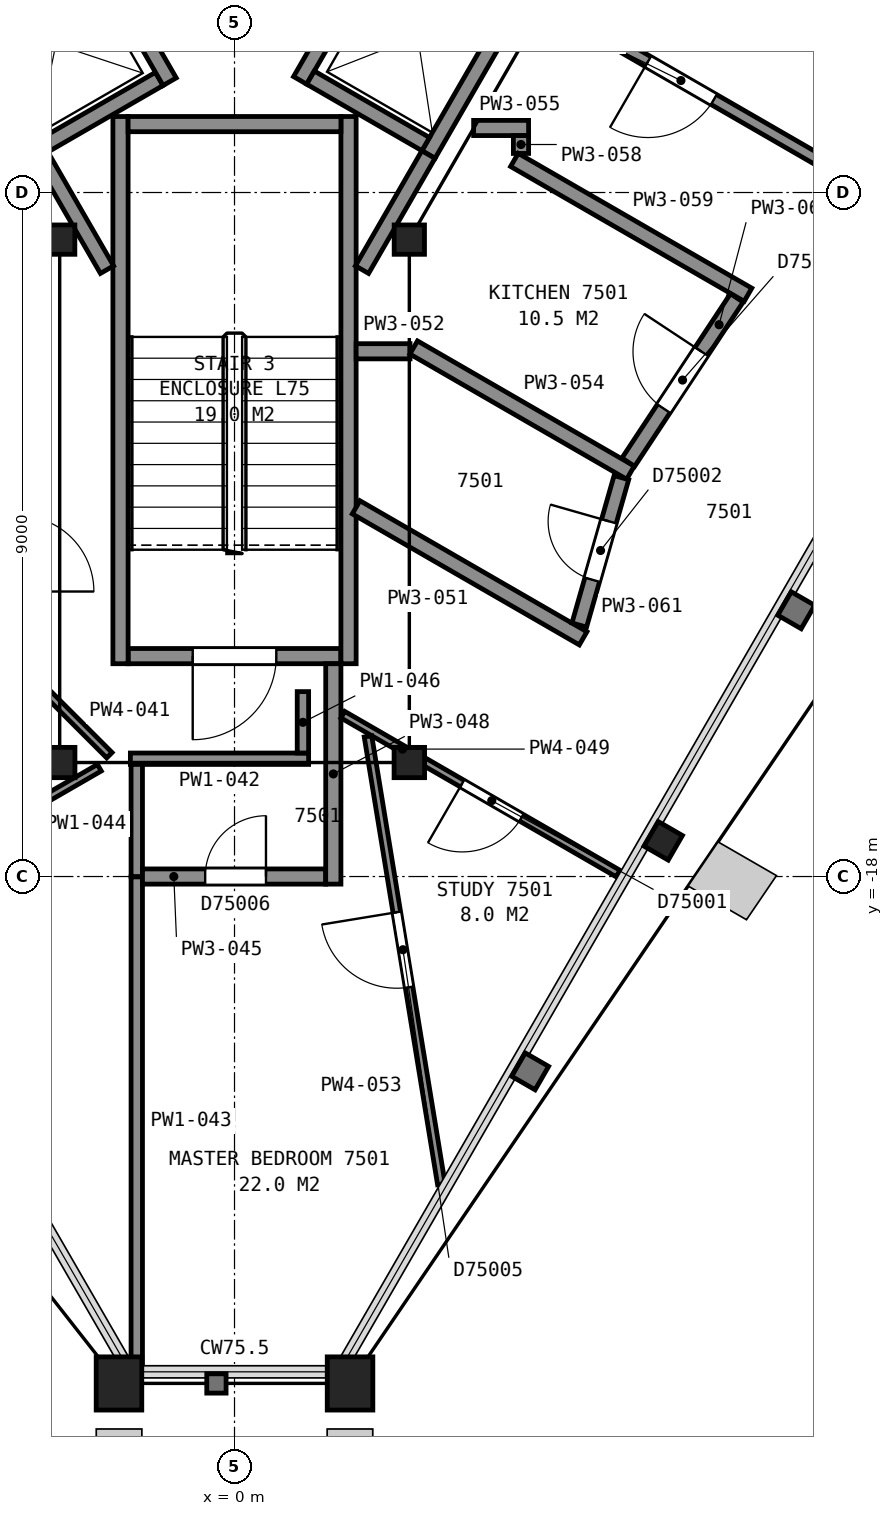
"""IFC4 building model, lengths in metres.
Left out: names, types, materials, properties, quantities, classifications, styles, units other than length and angle.
Written with IfcOpenShell. Run it as: python <this file> out.ifc"""

import sys

from ifc_helpers import new_model, si_unit, direction, frame, frame_2d, origin, origin_2d, place, context, subcontext, project, spatial, rectangle, hollow_rectangle, i_section, extrude, element, fill, save


model = new_model("IFC4")
c1 = context("Model", 3, precision=1e-05, world=origin(), true_north=direction((0.0, 1.0)))
c2 = subcontext(c1, "Body", "Model", "MODEL_VIEW")
j1 = project(units=[si_unit("LENGTHUNIT", "METRE"), si_unit("PLANEANGLEUNIT", "RADIAN")], contexts=[c1])
p1 = place(None, origin())
s1 = spatial("IfcSite", under=j1, at=p1, CompositionType="ELEMENT")
p2 = place(p1, origin())
s2 = spatial("IfcBuilding", under=s1, at=p2, CompositionType="ELEMENT")
p3 = place(p2, frame((0.0, 0.0, 297.3)))
s3 = spatial("IfcBuildingStorey", under=s2, at=p3, CompositionType="ELEMENT", Elevation=297.3)
for number, where, z_axis, x_axis in (
    (1, (-1.52, -24.67, 0.0), (0.0, 0.0, 1.0), (-1.0, 0.0, 0.0)),
    (2, (1.52, -24.67, 0.0), (0.0, 0.0, 1.0), (-1.0, 0.0, 0.0)),
):
    element("IfcColumn", number, at=place(p3, frame(where, z_axis=z_axis, x_axis=x_axis)), inside=s3, PredefinedType="COLUMN", context=c2, shape_type="SweptSolid", body=[
        extrude(hollow_rectangle(XDim=0.6, YDim=0.7, WallThickness=0.04, at=origin_2d()), origin(), (0.0, 0.0, 1.0), 3.7),
    ])
p4 = place(p3, frame((5.64, -17.53, 0.0), z_axis=(0.0, 0.0, 1.0), x_axis=(-0.5, -0.866025403784, 0.0)))
e3 = element("IfcColumn", 3, at=p4, inside=s3, PredefinedType="COLUMN", context=c2, shape_type="SweptSolid", body=[
    extrude(i_section(OverallWidth=0.373, OverallDepth=0.368, WebThickness=0.015, FlangeThickness=0.024, FilletRadius=0.015, at=origin_2d()), origin(), (0.0, 0.0, 1.0), 3.7),
])
p5 = place(p3, frame((-2.3, -9.62, 0.0), z_axis=(0.0, 0.0, 1.0), x_axis=(1.0, 0.0, 0.0)))
e4 = element("IfcColumn", 4, at=p5, inside=s3, PredefinedType="COLUMN", context=c2, shape_type="SweptSolid", body=[
    extrude(i_section(OverallWidth=0.399, OverallDepth=0.386, WebThickness=0.021, FlangeThickness=0.033, FilletRadius=0.015, at=origin_2d()), origin(), (0.0, 0.0, 1.0), 3.7),
])
for number, where, z_axis, x_axis in (
    (5, (-2.3, -16.5, 0.0), (0.0, 0.0, 1.0), (-1.0, 0.0, 0.0)),
    (6, (2.3, -16.5, 0.0), (0.0, 0.0, 1.0), (-1.0, 0.0, 0.0)),
):
    element("IfcColumn", number, at=place(p3, frame(where, z_axis=z_axis, x_axis=x_axis)), inside=s3, PredefinedType="COLUMN", context=c2, shape_type="SweptSolid", body=[
        extrude(i_section(OverallWidth=0.401, OverallDepth=0.399, WebThickness=0.025, FlangeThickness=0.04, FilletRadius=0.015, at=origin_2d()), origin(), (0.0, 0.0, 1.0), 3.7),
    ])
p6 = place(p3, frame((2.3, -9.62, 0.0), z_axis=(0.0, 0.0, 1.0), x_axis=(1.0, 0.0, 0.0)))
e7 = element("IfcColumn", 7, at=p6, inside=s3, PredefinedType="COLUMN", context=c2, shape_type="SweptSolid", body=[
    extrude(i_section(OverallWidth=0.399, OverallDepth=0.386, WebThickness=0.021, FlangeThickness=0.033, FilletRadius=0.015, at=origin_2d()), origin(), (0.0, 0.0, 1.0), 3.7),
])
p7 = place(p3, frame((-1.4, -15.1, 0.0), z_axis=(0.0, 0.0, 1.0), x_axis=(1.0, 0.0, 0.0)))
e8 = element("IfcWall", 8, at=p7, inside=s3, PredefinedType="PARTITIONING", context=c2, shape_type="SweptSolid", body=[
    extrude(rectangle(XDim=2.8, YDim=0.2, at=frame_2d((1.4, 0.0))), origin(), (0.0, 0.0, 1.0), 3.45),
])
p8 = place(p7, frame((0.85, 0.0, 0.0)))
e9 = element("IfcOpeningElement", 9, at=p8, cuts=e8, PredefinedType="OPENING", context=c2, shape_type="SweptSolid", body=[
    extrude(rectangle(XDim=1.1, YDim=2.1, at=frame_2d((0.55, 1.05))), frame((0.0, 0.11, 0.0), z_axis=(0.0, -1.0, 0.0), x_axis=(1.0, 0.0, 0.0)), (0.0, 0.0, 1.0), 0.22),
])
for number, where, z_axis, x_axis in (
    (10, (1.5, -8.0, 0.0), (0.0, 0.0, 1.0), (0.0, -1.0, 0.0)),
    (11, (-1.5, -8.0, 0.0), (0.0, 0.0, 1.0), (0.0, -1.0, 0.0)),
):
    element("IfcWall", number, at=place(p3, frame(where, z_axis=z_axis, x_axis=x_axis)), inside=s3, PredefinedType="PARTITIONING", context=c2, shape_type="SweptSolid", body=[
        extrude(rectangle(XDim=7.2, YDim=0.2, at=frame_2d((3.6, 0.0))), origin(), (0.0, 0.0, 1.0), 3.45),
    ])
p9 = place(p3, frame((-1.4, -8.1, 0.0), z_axis=(0.0, 0.0, 1.0), x_axis=(1.0, 0.0, 0.0)))
e12 = element("IfcWall", 12, at=p9, inside=s3, PredefinedType="PARTITIONING", context=c2, shape_type="SweptSolid", body=[
    extrude(rectangle(XDim=2.8, YDim=0.2, at=frame_2d((1.4, 0.0))), origin(), (0.0, 0.0, 1.0), 3.45),
])
p10 = place(p3, frame((-2.505, -8.38, 0.0), z_axis=(0.0, 0.0, 1.0), x_axis=(0.866002029911, 0.500040482552, 0.0)))
e13 = element("IfcWall", 13, at=p10, inside=s3, PredefinedType="PARTITIONING", context=c2, shape_type="SweptSolid", body=[
    extrude(rectangle(XDim=1.75, YDim=0.2, at=frame_2d((0.875, 0.0))), origin(), (0.0, 0.0, 1.0), 3.7),
])
p11 = place(p3, frame((2.552, -8.5, 0.0), z_axis=(0.0, 0.0, 1.0), x_axis=(0.499990435942, 0.866030925526, 0.0)))
e14 = element("IfcWall", 14, at=p11, inside=s3, PredefinedType="PARTITIONING", context=c2, shape_type="SweptSolid", body=[
    extrude(rectangle(XDim=2.55, YDim=0.2, at=frame_2d((1.275, 0.0))), origin(), (0.0, 0.0, 1.0), 3.7),
])
p12 = place(p3, frame((0.863, -7.525, 0.0), z_axis=(0.0, 0.0, 1.0), x_axis=(0.499990435942, 0.866030925526, 0.0)))
e15 = element("IfcWall", 15, at=p12, inside=s3, PredefinedType="PARTITIONING", context=c2, shape_type="SweptSolid", body=[
    extrude(rectangle(XDim=2.55, YDim=0.2, at=frame_2d((1.275, 0.0))), origin(), (0.0, 0.0, 1.0), 3.7),
])
p13 = place(p12, frame((0.725, 0.0, 0.0)))
e16 = element("IfcOpeningElement", 16, at=p13, cuts=e15, PredefinedType="OPENING", context=c2, shape_type="SweptSolid", body=[
    extrude(rectangle(XDim=1.1, YDim=2.1, at=frame_2d((0.55, 1.05))), frame((0.0, 0.11, 0.0), z_axis=(0.0, -1.0, 0.0), x_axis=(1.0, 0.0, 0.0)), (0.0, 0.0, 1.0), 0.22),
])
p14 = place(p3, frame((-0.853, -7.542, 0.0), z_axis=(0.0, 0.0, 1.0), x_axis=(-0.500016218704, 0.866016039709, 0.0)))
e17 = element("IfcWall", 17, at=p14, inside=s3, PredefinedType="PARTITIONING", context=c2, shape_type="SweptSolid", body=[
    extrude(rectangle(XDim=2.35, YDim=0.2, at=frame_2d((1.175, 0.0))), origin(), (0.0, 0.0, 1.0), 3.7),
])
p15 = place(p14, frame((0.625, 0.0, 0.0)))
e18 = element("IfcOpeningElement", 18, at=p15, cuts=e17, PredefinedType="OPENING", context=c2, shape_type="SweptSolid", body=[
    extrude(rectangle(XDim=1.1, YDim=2.1, at=frame_2d((0.55, 1.05))), frame((0.0, 0.11, 0.0), z_axis=(0.0, -1.0, 0.0), x_axis=(1.0, 0.0, 0.0)), (0.0, 0.0, 1.0), 0.22),
])
p16 = place(p3, frame((2.515, -8.363, 0.0), z_axis=(0.0, 0.0, 1.0), x_axis=(-0.866036909293, 0.499980071345, 0.0)))
e19 = element("IfcWall", 19, at=p16, inside=s3, PredefinedType="PARTITIONING", context=c2, shape_type="SweptSolid", body=[
    extrude(rectangle(XDim=1.75, YDim=0.2, at=frame_2d((0.875, 0.0))), origin(), (0.0, 0.0, 1.0), 3.7),
])
p17 = place(p3, frame((-2.541, -8.519, 0.0), z_axis=(0.0, 0.0, 1.0), x_axis=(0.500016142392, -0.86601608377, 0.0)))
e20 = element("IfcWall", 20, at=p17, inside=s3, PredefinedType="PARTITIONING", context=c2, shape_type="SweptSolid", body=[
    extrude(rectangle(XDim=1.727, YDim=0.2, at=frame_2d((0.864, 0.0))), origin(), (0.0, 0.0, 1.0), 3.45),
])
p18 = place(p3, frame((1.677, -10.015, 0.0), z_axis=(0.0, 0.0, 1.0), x_axis=(0.49983532306, 0.866120459187, 0.0)))
e21 = element("IfcWall", 21, at=p18, inside=s3, PredefinedType="PARTITIONING", context=c2, shape_type="SweptSolid", body=[
    extrude(rectangle(XDim=1.748, YDim=0.2, at=frame_2d((0.874, 0.0))), origin(), (0.0, 0.0, 1.0), 3.45),
])
p19 = place(p3, frame((-1.778, -16.568, 0.0), z_axis=(0.0, 0.0, 1.0), x_axis=(-0.866019606374, -0.500010041276, 0.0)))
e22 = element("IfcWall", 22, at=p19, inside=s3, PredefinedType="PARTITIONING", context=c2, shape_type="SweptSolid", body=[
    extrude(rectangle(XDim=3.527, YDim=0.1, at=frame_2d((1.764, 0.0))), origin(), (0.0, 0.0, 1.0), 2.723),
])
p20 = place(p19, frame((1.124, 0.0, 0.0)))
e23 = element("IfcOpeningElement", 23, at=p20, cuts=e22, PredefinedType="OPENING", context=c2, shape_type="SweptSolid", body=[
    extrude(rectangle(XDim=1.0, YDim=2.1, at=frame_2d((0.5, 1.05))), frame((0.0, 0.06, 0.0), z_axis=(0.0, -1.0, 0.0), x_axis=(1.0, 0.0, 0.0)), (0.0, 0.0, 1.0), 0.12),
])
p21 = place(p3, frame((-2.801, -15.25, 0.0), z_axis=(0.0, 0.0, 1.0), x_axis=(0.707181547962, -0.707032006505, 0.0)))
e24 = element("IfcWall", 24, at=p21, inside=s3, PredefinedType="PARTITIONING", context=c2, shape_type="SweptSolid", body=[
    extrude(rectangle(XDim=1.633, YDim=0.1, at=frame_2d((0.816, 0.0))), origin(), (0.0, 0.0, 1.0), 2.723),
])
p22 = place(p3, frame((-1.37, -16.45, 0.0), z_axis=(0.0, 0.0, 1.0), x_axis=(1.0, 0.0, 0.0)))
e25 = element("IfcWall", 25, at=p22, inside=s3, PredefinedType="PARTITIONING", context=c2, shape_type="SweptSolid", body=[
    extrude(rectangle(XDim=2.345, YDim=0.15, at=frame_2d((1.173, 0.0))), origin(), (0.0, 0.0, 1.0), 2.723),
])
p23 = place(p3, frame((-1.286, -24.421, 0.0), z_axis=(0.0, 0.0, 1.0), x_axis=(0.0, 1.0, 0.0)))
e26 = element("IfcWall", 26, at=p23, inside=s3, PredefinedType="PARTITIONING", context=c2, shape_type="SweptSolid", body=[
    extrude(rectangle(XDim=6.416, YDim=0.15, at=frame_2d((3.208, 0.0))), origin(), (0.0, 0.0, 1.0), 2.723),
])
p24 = place(p3, frame((-1.286, -18.0, 0.0), z_axis=(0.0, 0.0, 1.0), x_axis=(0.0, 1.0, 0.0)))
e27 = element("IfcWall", 27, at=p24, inside=s3, PredefinedType="PARTITIONING", context=c2, shape_type="SweptSolid", body=[
    extrude(rectangle(XDim=1.475, YDim=0.15, at=frame_2d((0.738, 0.0))), origin(), (0.0, 0.0, 1.0), 2.723),
])
p25 = place(p3, frame((-1.211, -18.0, 0.0), z_axis=(0.0, 0.0, 1.0), x_axis=(1.0, 0.0, 0.0)))
e28 = element("IfcWall", 28, at=p25, inside=s3, PredefinedType="PARTITIONING", context=c2, shape_type="SweptSolid", body=[
    extrude(rectangle(XDim=2.411, YDim=0.2, at=frame_2d((1.206, 0.0))), origin(), (0.0, 0.0, 1.0), 2.723),
])
p26 = place(p25, frame((0.825, 0.0, 0.0)))
e29 = element("IfcOpeningElement", 29, at=p26, cuts=e28, PredefinedType="OPENING", context=c2, shape_type="SweptSolid", body=[
    extrude(rectangle(XDim=0.8, YDim=2.1, at=frame_2d((0.4, 1.05))), frame((0.0, 0.11, 0.0), z_axis=(0.0, -1.0, 0.0), x_axis=(1.0, 0.0, 0.0)), (0.0, 0.0, 1.0), 0.22),
])
p27 = place(p3, frame((0.9, -16.375, 0.0), z_axis=(0.0, 0.0, 1.0), x_axis=(0.0, 1.0, 0.0)))
e30 = element("IfcWall", 30, at=p27, inside=s3, PredefinedType="PARTITIONING", context=c2, shape_type="SweptSolid", body=[
    extrude(rectangle(XDim=0.808, YDim=0.15, at=frame_2d((0.404, 0.0))), origin(), (0.0, 0.0, 1.0), 2.723),
])
p28 = place(p3, frame((1.3, -18.1, 0.0), z_axis=(0.0, 0.0, 1.0), x_axis=(0.0, 1.0, 0.0)))
e31 = element("IfcWall", 31, at=p28, inside=s3, PredefinedType="PARTITIONING", context=c2, shape_type="SweptSolid", body=[
    extrude(rectangle(XDim=2.9, YDim=0.2, at=frame_2d((1.45, 0.0))), origin(), (0.0, 0.0, 1.0), 2.723),
])
p29 = place(p3, frame((5.047, -17.961, 0.0), z_axis=(0.0, 0.0, 1.0), x_axis=(-0.866050460131, 0.499956598623, 0.0)))
e32 = element("IfcWall", 32, at=p29, inside=s3, PredefinedType="PARTITIONING", context=c2, shape_type="SweptSolid", body=[
    extrude(rectangle(XDim=4.182, YDim=0.1, at=frame_2d((2.091, 0.0))), origin(), (0.0, 0.0, 1.0), 2.723),
])
p30 = place(p29, frame((1.469, 0.0, 0.0)))
e33 = element("IfcOpeningElement", 33, at=p30, cuts=e32, PredefinedType="OPENING", context=c2, shape_type="SweptSolid", body=[
    extrude(rectangle(XDim=0.9, YDim=2.1, at=frame_2d((0.45, 1.05))), frame((0.0, 0.06, 0.0), z_axis=(0.0, -1.0, 0.0), x_axis=(1.0, 0.0, 0.0)), (0.0, 0.0, 1.0), 0.12),
])
p31 = place(p3, frame((1.6, -13.142, 0.0), z_axis=(0.0, 0.0, 1.0), x_axis=(0.866078307516, -0.499908356852, 0.0)))
e34 = element("IfcWall", 34, at=p31, inside=s3, PredefinedType="PARTITIONING", context=c2, shape_type="SweptSolid", body=[
    extrude(rectangle(XDim=3.448, YDim=0.2, at=frame_2d((1.724, 0.0))), origin(), (0.0, 0.0, 1.0), 2.723),
])
p32 = place(p3, frame((1.6, -11.089, 0.0), z_axis=(0.0, 0.0, 1.0), x_axis=(1.0, 0.0, 0.0)))
e35 = element("IfcWall", 35, at=p32, inside=s3, PredefinedType="PARTITIONING", context=c2, shape_type="SweptSolid", body=[
    extrude(rectangle(XDim=0.709, YDim=0.2, at=frame_2d((0.354, 0.0))), origin(), (0.0, 0.0, 1.0), 2.723),
])
p33 = place(p3, frame((2.721, -22.048, 0.0), z_axis=(0.0, 0.0, 1.0), x_axis=(-0.161659467857, 0.98684660229, 0.0)))
e36 = element("IfcWall", 36, at=p33, inside=s3, PredefinedType="PARTITIONING", context=c2, shape_type="SweptSolid", body=[
    extrude(rectangle(XDim=5.97, YDim=0.1, at=frame_2d((2.985, 0.0))), origin(), (0.0, 0.0, 1.0), 2.723),
])
p34 = place(p33, frame((2.625, 0.0, 0.0)))
e37 = element("IfcOpeningElement", 37, at=p34, cuts=e36, PredefinedType="OPENING", context=c2, shape_type="SweptSolid", body=[
    extrude(rectangle(XDim=1.0, YDim=2.1, at=frame_2d((0.5, 1.05))), frame((0.0, 0.06, 0.0), z_axis=(0.0, -1.0, 0.0), x_axis=(1.0, 0.0, 0.0)), (0.0, 0.0, 1.0), 0.12),
])
p35 = place(p3, frame((2.357, -11.039, 0.0), z_axis=(0.0, 0.0, 1.0), x_axis=(0.865999185644, -0.500045408402, 0.0)))
e38 = element("IfcWall", 38, at=p35, inside=s3, PredefinedType="PARTITIONING", context=c2, shape_type="SweptSolid", body=[
    extrude(rectangle(XDim=3.294, YDim=0.2, at=frame_2d((1.647, 0.0))), origin(), (0.0, 0.0, 1.0), 2.723),
])
p36 = place(p3, frame((3.146, -8.151, 0.0), z_axis=(0.0, 0.0, 1.0), x_axis=(1.0, 0.0, 0.0)))
e39 = element("IfcWall", 39, at=p36, inside=s3, PredefinedType="PARTITIONING", context=c2, shape_type="SweptSolid", body=[
    extrude(rectangle(XDim=0.723, YDim=0.2, at=frame_2d((0.361, 0.0))), origin(), (0.0, 0.0, 1.0), 2.723),
])
p37 = place(p3, frame((3.769, -8.486, 0.0), z_axis=(0.0, 0.0, 1.0), x_axis=(0.0, 1.0, 0.0)))
e40 = element("IfcWall", 40, at=p37, inside=s3, PredefinedType="PARTITIONING", context=c2, shape_type="SweptSolid", body=[
    extrude(rectangle(XDim=0.235, YDim=0.2, at=frame_2d((0.118, 0.0))), origin(), (0.0, 0.0, 1.0), 2.723),
])
p38 = place(p3, frame((3.682, -8.571, 0.0), z_axis=(0.0, 0.0, 1.0), x_axis=(0.866075604562, -0.499913039621, 0.0)))
e41 = element("IfcWall", 41, at=p38, inside=s3, PredefinedType="PARTITIONING", context=c2, shape_type="SweptSolid", body=[
    extrude(rectangle(XDim=3.549, YDim=0.2, at=frame_2d((1.774, 0.0))), origin(), (0.0, 0.0, 1.0), 2.723),
])
p39 = place(p3, frame((9.772, -9.777, 0.0), z_axis=(0.0, 0.0, 1.0), x_axis=(-0.866083818164, 0.499898809675, 0.0)))
e42 = element("IfcWall", 42, at=p39, inside=s3, PredefinedType="PARTITIONING", context=c2, shape_type="SweptSolid", body=[
    extrude(rectangle(XDim=6.551, YDim=0.15, at=frame_2d((3.275, 0.0))), origin(), (0.0, 0.0, 1.0), 2.723),
])
p40 = place(p39, frame((4.001, 0.0, 0.0)))
e43 = element("IfcOpeningElement", 43, at=p40, cuts=e42, PredefinedType="OPENING", context=c2, shape_type="SweptSolid", body=[
    extrude(rectangle(XDim=1.0, YDim=2.1, at=frame_2d((0.5, 1.05))), frame((0.0, 0.085, 0.0), z_axis=(0.0, -1.0, 0.0), x_axis=(1.0, 0.0, 0.0)), (0.0, 0.0, 1.0), 0.17),
])
p41 = place(p3, frame((4.536, -14.691, 0.0), z_axis=(0.0, 0.0, 1.0), x_axis=(0.27486499374, 0.961482831472, 0.0)))
e44 = element("IfcWall", 44, at=p41, inside=s3, PredefinedType="PARTITIONING", context=c2, shape_type="SweptSolid", body=[
    extrude(rectangle(XDim=2.017, YDim=0.2, at=frame_2d((1.009, 0.0))), origin(), (0.0, 0.0, 1.0), 2.723),
])
p42 = place(p41, frame((0.62, 0.0, 0.0)))
e45 = element("IfcOpeningElement", 45, at=p42, cuts=e44, PredefinedType="OPENING", context=c2, shape_type="SweptSolid", body=[
    extrude(rectangle(XDim=0.8, YDim=2.1, at=frame_2d((0.4, 1.05))), frame((0.0, 0.11, 0.0), z_axis=(0.0, -1.0, 0.0), x_axis=(1.0, 0.0, 0.0)), (0.0, 0.0, 1.0), 0.22),
])
p43 = place(p3, frame((5.181, -12.548, 0.0), z_axis=(0.0, 0.0, 1.0), x_axis=(0.55106277299, 0.834463792039, 0.0)))
e46 = element("IfcWall", 46, at=p43, inside=s3, PredefinedType="PARTITIONING", context=c2, shape_type="SweptSolid", body=[
    extrude(rectangle(XDim=2.59, YDim=0.2, at=frame_2d((1.295, 0.0))), origin(), (0.0, 0.0, 1.0), 2.723),
])
p44 = place(p43, frame((0.845, 0.0, 0.0)))
e47 = element("IfcOpeningElement", 47, at=p44, cuts=e46, PredefinedType="OPENING", context=c2, shape_type="SweptSolid", body=[
    extrude(rectangle(XDim=0.9, YDim=2.1, at=frame_2d((0.45, 1.05))), frame((0.0, 0.11, 0.0), z_axis=(0.0, -1.0, 0.0), x_axis=(1.0, 0.0, 0.0)), (0.0, 0.0, 1.0), 0.22),
])
p45 = place(p8, origin())
e48 = element("IfcDoor", 48, at=p45, inside=s3, OperationType="SINGLE_SWING_LEFT", PredefinedType="DOOR", context=c2, shape_type="SweptSolid", body=[
    extrude(rectangle(XDim=1.1, YDim=2.1, at=frame_2d((0.55, 1.05))), frame((0.0, 0.025, 0.0), z_axis=(0.0, -1.0, 0.0), x_axis=(1.0, 0.0, 0.0)), (0.0, 0.0, 1.0), 0.05),
])
fill(e9, e48)
p46 = place(p26, origin())
e49 = element("IfcDoor", 49, at=p46, inside=s3, OperationType="SINGLE_SWING_RIGHT", PredefinedType="DOOR", context=c2, shape_type="SweptSolid", body=[
    extrude(rectangle(XDim=0.8, YDim=2.1, at=frame_2d((0.4, 1.05))), frame((0.0, 0.025, 0.0), z_axis=(0.0, -1.0, 0.0), x_axis=(1.0, 0.0, 0.0)), (0.0, 0.0, 1.0), 0.05),
])
fill(e29, e49)
p47 = place(p30, origin())
e50 = element("IfcDoor", 50, at=p47, inside=s3, OperationType="SINGLE_SWING_RIGHT", PredefinedType="DOOR", context=c2, shape_type="SweptSolid", body=[
    extrude(rectangle(XDim=0.9, YDim=2.1, at=frame_2d((0.45, 1.05))), frame((0.0, 0.025, 0.0), z_axis=(0.0, -1.0, 0.0), x_axis=(1.0, 0.0, 0.0)), (0.0, 0.0, 1.0), 0.05),
])
fill(e33, e50)
p48 = place(p34, origin())
e51 = element("IfcDoor", 51, at=p48, inside=s3, OperationType="SINGLE_SWING_RIGHT", PredefinedType="DOOR", context=c2, shape_type="SweptSolid", body=[
    extrude(rectangle(XDim=1.0, YDim=2.1, at=frame_2d((0.5, 1.05))), frame((0.0, 0.025, 0.0), z_axis=(0.0, -1.0, 0.0), x_axis=(1.0, 0.0, 0.0)), (0.0, 0.0, 1.0), 0.05),
])
fill(e37, e51)
p49 = place(p40, origin())
e52 = element("IfcDoor", 52, at=p49, inside=s3, OperationType="SINGLE_SWING_RIGHT", PredefinedType="DOOR", context=c2, shape_type="SweptSolid", body=[
    extrude(rectangle(XDim=1.0, YDim=2.1, at=frame_2d((0.5, 1.05))), frame((0.0, 0.025, 0.0), z_axis=(0.0, -1.0, 0.0), x_axis=(1.0, 0.0, 0.0)), (0.0, 0.0, 1.0), 0.05),
])
fill(e43, e52)
p50 = place(p42, origin())
e53 = element("IfcDoor", 53, at=p50, inside=s3, OperationType="SINGLE_SWING_RIGHT", PredefinedType="DOOR", context=c2, shape_type="SweptSolid", body=[
    extrude(rectangle(XDim=0.8, YDim=2.1, at=frame_2d((0.4, 1.05))), frame((0.0, 0.025, 0.0), z_axis=(0.0, -1.0, 0.0), x_axis=(1.0, 0.0, 0.0)), (0.0, 0.0, 1.0), 0.05),
])
fill(e45, e53)
p51 = place(p44, origin())
e54 = element("IfcDoor", 54, at=p51, inside=s3, OperationType="SINGLE_SWING_RIGHT", PredefinedType="DOOR", context=c2, shape_type="SweptSolid", body=[
    extrude(rectangle(XDim=0.9, YDim=2.1, at=frame_2d((0.45, 1.05))), frame((0.0, 0.025, 0.0), z_axis=(0.0, -1.0, 0.0), x_axis=(1.0, 0.0, 0.0)), (0.0, 0.0, 1.0), 0.05),
])
fill(e47, e54)
save(model, sys.argv[1])
